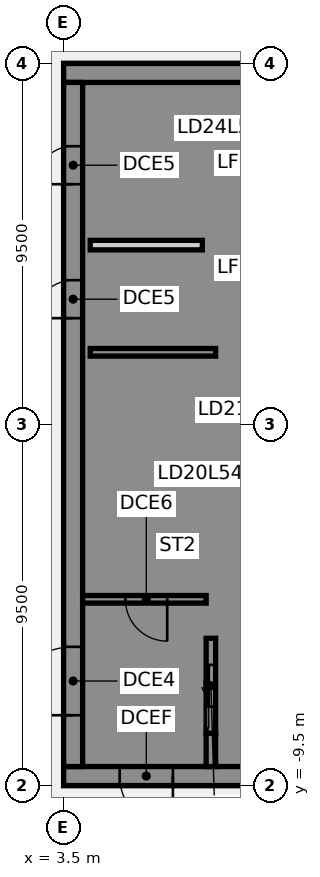
"""IFC4 building model, lengths in metres.
Left out: names, types, materials, properties, quantities, classifications, styles, units other than length and angle.
Written with IfcOpenShell. Run it as: python <this file> out.ifc"""

import sys

from ifc_helpers import new_model, si_unit, direction, frame, frame_2d, origin, place, context, subcontext, project, spatial, polyline, rectangle, outline, extrude, element, fill, save


model = new_model("IFC4")
c1 = context("Model", 3, precision=1e-05, world=origin(), true_north=direction((0.0, 1.0)))
c2 = subcontext(c1, "Body", "Model", "MODEL_VIEW")
j1 = project(units=[si_unit("LENGTHUNIT", "METRE"), si_unit("PLANEANGLEUNIT", "RADIAN")], contexts=[c1])
p1 = place(None, origin())
s1 = spatial("IfcSite", under=j1, at=p1, CompositionType="ELEMENT")
p2 = place(p1, origin())
s2 = spatial("IfcBuilding", under=s1, at=p2, CompositionType="ELEMENT")
p3 = place(p2, frame((0.0, 0.0, 214.9)))
s3 = spatial("IfcBuildingStorey", under=s2, at=p3, CompositionType="ELEMENT", Elevation=214.9)
p4 = place(p3, frame((16.5, -9.25, 0.0), z_axis=(0.0, 0.0, 1.0), x_axis=(-1.0, 0.0, 0.0)))
e1 = element("IfcWall", 1, at=p4, inside=s3, PredefinedType="SHEAR", context=c2, shape_type="SweptSolid", body=[
    extrude(rectangle(XDim=13.0, YDim=0.5, at=frame_2d((6.5, 0.0))), origin(), (0.0, 0.0, 1.0), 4.86),
])
p5 = place(p4, frame((4.15, 0.0, 0.0)))
e2 = element("IfcOpeningElement", 2, at=p5, cuts=e1, PredefinedType="OPENING", context=c2, shape_type="SweptSolid", body=[
    extrude(rectangle(XDim=1.4, YDim=2.1, at=frame_2d((0.7, 1.05))), frame((0.0, 0.26, 0.0), z_axis=(0.0, -1.0, 0.0), x_axis=(1.0, 0.0, 0.0)), (0.0, 0.0, 1.0), 0.52),
])
p6 = place(p4, frame((10.125, 0.0, 0.0)))
e3 = element("IfcOpeningElement", 3, at=p6, cuts=e1, PredefinedType="OPENING", context=c2, shape_type="SweptSolid", body=[
    extrude(rectangle(XDim=1.4, YDim=2.1, at=frame_2d((0.7, 1.05))), frame((0.0, 0.26, 0.0), z_axis=(0.0, -1.0, 0.0), x_axis=(1.0, 0.0, 0.0)), (0.0, 0.0, 1.0), 0.52),
])
p7 = place(p3, frame((16.5, 9.25, 0.0), z_axis=(0.0, 0.0, 1.0), x_axis=(-1.0, 0.0, 0.0)))
e4 = element("IfcWall", 4, at=p7, inside=s3, PredefinedType="SHEAR", context=c2, shape_type="SweptSolid", body=[
    extrude(rectangle(XDim=13.0, YDim=0.5, at=frame_2d((6.5, 0.0))), origin(), (0.0, 0.0, 1.0), 4.86),
])
p8 = place(p7, frame((4.15, 0.0, 0.0)))
e5 = element("IfcOpeningElement", 5, at=p8, cuts=e4, PredefinedType="OPENING", context=c2, shape_type="SweptSolid", body=[
    extrude(rectangle(XDim=1.4, YDim=2.1, at=frame_2d((0.7, 1.05))), frame((0.0, 0.26, 0.0), z_axis=(0.0, -1.0, 0.0), x_axis=(1.0, 0.0, 0.0)), (0.0, 0.0, 1.0), 0.52),
])
p9 = place(p3, origin())
e6 = element("IfcWall", 6, at=p9, inside=s3, PredefinedType="SHEAR", context=c2, shape_type="SweptSolid", body=[
    extrude(outline(polyline([(9.8, -5.375), (7.5, -5.375), (7.5, -2.875), (9.8, -2.875), (9.8, -2.625), (7.5, -2.625), (7.5, -0.125), (9.8, -0.125), (9.8, 0.125), (7.5, 0.125), (7.5, 2.625), (9.8, 2.625), (9.8, 2.875), (7.5, 2.875), (7.5, 5.375), (9.8, 5.375), (9.8, 5.625), (7.5, 5.625), (7.5, 8.125), (9.8, 8.125), (9.8, 9.0), (7.5, 9.0), (7.25, 9.0), (7.25, -5.625), (7.5, -5.625), (9.8, -5.625), (9.8, -5.375)])), origin(), (0.0, 0.0, 1.0), 4.86),
])
p10 = place(p3, origin())
e7 = element("IfcWall", 7, at=p10, inside=s3, PredefinedType="SHEAR", context=c2, shape_type="SweptSolid", body=[
    extrude(outline(polyline([(7.5, -8.125), (7.5, -9.0), (9.8, -9.0), (9.8, -8.125), (9.8, -5.625), (9.55, -5.625), (9.55, -8.125), (7.5, -8.125)])), origin(), (0.0, 0.0, 1.0), 4.86),
])
p11 = place(p3, frame((7.375, -9.0, 0.0), z_axis=(0.0, 0.0, 1.0), x_axis=(0.0, 1.0, 0.0)))
e8 = element("IfcWall", 8, at=p11, inside=s3, PredefinedType="SHEAR", context=c2, shape_type="SweptSolid", body=[
    extrude(rectangle(XDim=0.875, YDim=0.25, at=frame_2d((0.438, 0.0))), origin(), (0.0, 0.0, 1.0), 4.86),
])
p12 = place(p3, frame((7.5, 1.9, 0.0), z_axis=(0.0, 0.0, 1.0), x_axis=(-1.0, 0.0, 0.0)))
e9 = element("IfcWall", 9, at=p12, inside=s3, PredefinedType="SHEAR", context=c2, shape_type="SweptSolid", body=[
    extrude(rectangle(XDim=3.3, YDim=0.2, at=frame_2d((1.65, 0.0))), origin(), (0.0, 0.0, 1.0), 4.86),
])
p13 = place(p3, frame((7.375, -8.125, 0.0), z_axis=(0.0, 0.0, 1.0), x_axis=(0.0, 1.0, 0.0)))
e10 = element("IfcWall", 10, at=p13, inside=s3, PredefinedType="SHEAR", context=c2, shape_type="SweptSolid", body=[
    extrude(rectangle(XDim=2.5, YDim=0.25, at=frame_2d((1.25, 0.0))), origin(), (0.0, 0.0, 1.0), 4.86),
])
p14 = place(p13, frame((0.7, 0.0, 0.0)))
e11 = element("IfcOpeningElement", 11, at=p14, cuts=e10, PredefinedType="OPENING", context=c2, shape_type="SweptSolid", body=[
    extrude(rectangle(XDim=1.1, YDim=2.1, at=frame_2d((0.55, 1.05))), frame((0.0, 0.135, 0.0), z_axis=(0.0, -1.0, 0.0), x_axis=(1.0, 0.0, 0.0)), (0.0, 0.0, 1.0), 0.27),
])
p15 = place(p3, frame((3.75, -9.0, 0.0), z_axis=(0.0, 0.0, 1.0), x_axis=(0.0, 1.0, 0.0)))
e12 = element("IfcWall", 12, at=p15, inside=s3, PredefinedType="SHEAR", context=c2, shape_type="SweptSolid", body=[
    extrude(rectangle(XDim=18.0, YDim=0.5, at=frame_2d((9.0, 0.0))), origin(), (0.0, 0.0, 1.0), 4.86),
])
p16 = place(p15, frame((1.35, 0.0, 0.0)))
e13 = element("IfcOpeningElement", 13, at=p16, cuts=e12, PredefinedType="OPENING", context=c2, shape_type="SweptSolid", body=[
    extrude(rectangle(XDim=1.8, YDim=2.1, at=frame_2d((0.9, 1.05))), frame((0.0, 0.26, 0.0), z_axis=(0.0, -1.0, 0.0), x_axis=(1.0, 0.0, 0.0)), (0.0, 0.0, 1.0), 0.52),
])
p17 = place(p15, frame((11.798, 0.0, 0.0)))
e14 = element("IfcOpeningElement", 14, at=p17, cuts=e12, PredefinedType="OPENING", context=c2, shape_type="SweptSolid", body=[
    extrude(rectangle(XDim=1.0, YDim=2.1, at=frame_2d((0.5, 1.05))), frame((0.0, 0.26, 0.0), z_axis=(0.0, -1.0, 0.0), x_axis=(1.0, 0.0, 0.0)), (0.0, 0.0, 1.0), 0.52),
])
p18 = place(p15, frame((15.323, 0.0, 0.0)))
e15 = element("IfcOpeningElement", 15, at=p18, cuts=e12, PredefinedType="OPENING", context=c2, shape_type="SweptSolid", body=[
    extrude(rectangle(XDim=1.0, YDim=2.1, at=frame_2d((0.5, 1.05))), frame((0.0, 0.26, 0.0), z_axis=(0.0, -1.0, 0.0), x_axis=(1.0, 0.0, 0.0)), (0.0, 0.0, 1.0), 0.52),
])
p19 = place(p3, frame((7.15, 4.72, 0.0), z_axis=(0.0, 0.0, 1.0), x_axis=(-1.0, 0.0, 0.0)))
e16 = element("IfcWall", 16, at=p19, inside=s3, PredefinedType="PARTITIONING", context=c2, shape_type="SweptSolid", body=[
    extrude(rectangle(XDim=2.95, YDim=0.25, at=frame_2d((1.475, 0.0))), origin(), (0.0, 0.0, 1.0), 4.86),
])
p20 = place(p3, frame((7.25, -4.6, 0.0), z_axis=(0.0, 0.0, 1.0), x_axis=(-1.0, 0.0, 0.0)))
e17 = element("IfcWall", 17, at=p20, inside=s3, PredefinedType="SHEAR", context=c2, shape_type="SweptSolid", body=[
    extrude(rectangle(XDim=3.25, YDim=0.2, at=frame_2d((1.625, 0.0))), origin(), (0.0, 0.0, 1.0), 4.86),
])
p21 = place(p20, frame((1.025, 0.0, 0.0)))
e18 = element("IfcOpeningElement", 18, at=p21, cuts=e17, PredefinedType="OPENING", context=c2, shape_type="SweptSolid", body=[
    extrude(rectangle(XDim=1.1, YDim=2.1, at=frame_2d((0.55, 1.05))), frame((0.0, 0.11, 0.0), z_axis=(0.0, -1.0, 0.0), x_axis=(1.0, 0.0, 0.0)), (0.0, 0.0, 1.0), 0.22),
])
p22 = place(p6, origin())
e19 = element("IfcDoor", 19, at=p22, inside=s3, OperationType="SINGLE_SWING_LEFT", PredefinedType="DOOR", context=c2, shape_type="SweptSolid", body=[
    extrude(rectangle(XDim=1.4, YDim=2.1, at=frame_2d((0.7, 1.05))), frame((0.0, 0.025, 0.0), z_axis=(0.0, -1.0, 0.0), x_axis=(1.0, 0.0, 0.0)), (0.0, 0.0, 1.0), 0.05),
])
fill(e3, e19)
p23 = place(p16, origin())
e20 = element("IfcDoor", 20, at=p23, inside=s3, OperationType="SINGLE_SWING_LEFT", PredefinedType="DOOR", context=c2, shape_type="SweptSolid", body=[
    extrude(rectangle(XDim=1.8, YDim=2.1, at=frame_2d((0.9, 1.05))), frame((0.0, 0.025, 0.0), z_axis=(0.0, -1.0, 0.0), x_axis=(1.0, 0.0, 0.0)), (0.0, 0.0, 1.0), 0.05),
])
fill(e13, e20)
p24 = place(p17, origin())
e21 = element("IfcDoor", 21, at=p24, inside=s3, OperationType="SINGLE_SWING_LEFT", PredefinedType="DOOR", context=c2, shape_type="SweptSolid", body=[
    extrude(rectangle(XDim=1.0, YDim=2.1, at=frame_2d((0.5, 1.05))), frame((0.0, -0.175, 0.0), z_axis=(0.0, -1.0, 0.0), x_axis=(1.0, 0.0, 0.0)), (0.0, 0.0, 1.0), 0.05),
])
fill(e14, e21)
p25 = place(p18, origin())
e22 = element("IfcDoor", 22, at=p25, inside=s3, OperationType="SINGLE_SWING_LEFT", PredefinedType="DOOR", context=c2, shape_type="SweptSolid", body=[
    extrude(rectangle(XDim=1.0, YDim=2.1, at=frame_2d((0.5, 1.05))), frame((0.0, -0.175, 0.0), z_axis=(0.0, -1.0, 0.0), x_axis=(1.0, 0.0, 0.0)), (0.0, 0.0, 1.0), 0.05),
])
fill(e15, e22)
p26 = place(p21, origin())
e23 = element("IfcDoor", 23, at=p26, inside=s3, OperationType="SINGLE_SWING_LEFT", PredefinedType="DOOR", context=c2, shape_type="SweptSolid", body=[
    extrude(rectangle(XDim=1.1, YDim=2.1, at=frame_2d((0.55, 1.05))), frame((0.0, 0.025, 0.0), z_axis=(0.0, -1.0, 0.0), x_axis=(1.0, 0.0, 0.0)), (0.0, 0.0, 1.0), 0.05),
])
fill(e18, e23)
p27 = place(p14, origin())
e24 = element("IfcDoor", 24, at=p27, inside=s3, OperationType="SLIDING_TO_LEFT", PredefinedType="DOOR", context=c2, shape_type="SweptSolid", body=[
    extrude(rectangle(XDim=1.1, YDim=2.1, at=frame_2d((0.55, 1.05))), frame((0.0, 0.025, 0.0), z_axis=(0.0, -1.0, 0.0), x_axis=(1.0, 0.0, 0.0)), (0.0, 0.0, 1.0), 0.05),
])
fill(e11, e24)
save(model, sys.argv[1])
